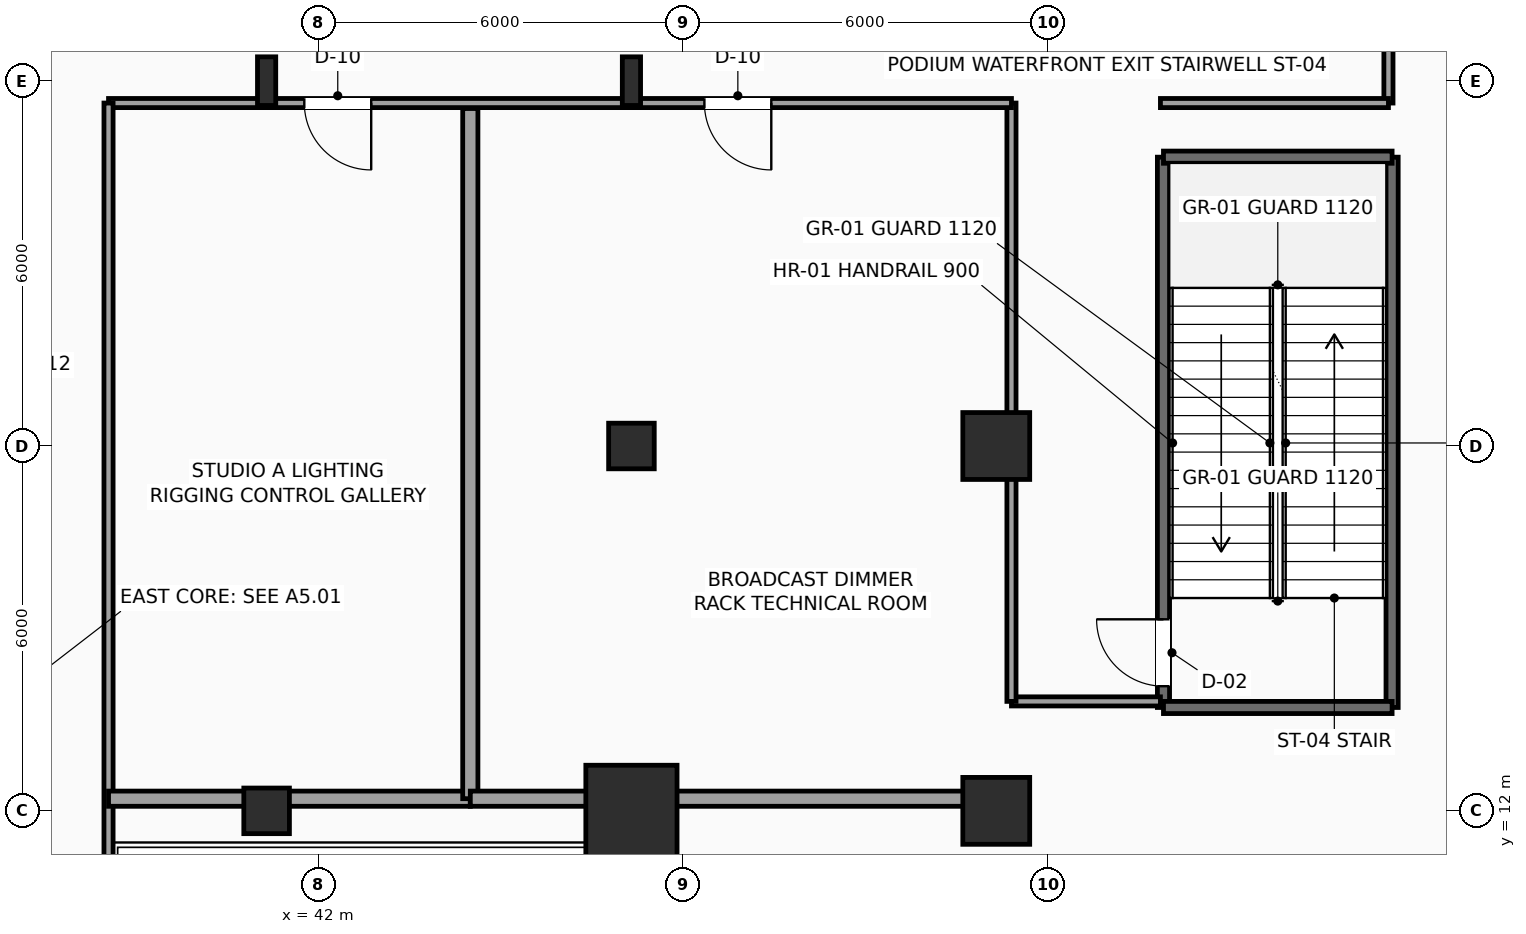
"""IFC4 building model, lengths in metres.
Left out: names, types, materials, properties, quantities, classifications, styles, units other than length and angle.
Written with IfcOpenShell. Run it as: python <this file> out.ifc"""

import sys

from ifc_helpers import new_model, si_unit, direction, frame, frame_2d, origin, origin_2d, place, context, subcontext, project, spatial, rectangle, hollow_rectangle, i_section, extrude, element, fill, save


model = new_model("IFC4")
c1 = context("Model", 3, precision=1e-05, world=origin(), true_north=direction((0.0, 1.0)))
c2 = subcontext(c1, "Body", "Model", "MODEL_VIEW")
j1 = project(units=[si_unit("LENGTHUNIT", "METRE"), si_unit("PLANEANGLEUNIT", "RADIAN")], contexts=[c1])
p1 = place(None, origin())
s1 = spatial("IfcSite", under=j1, at=p1, CompositionType="ELEMENT")
p2 = place(p1, origin())
s2 = spatial("IfcBuilding", under=s1, at=p2, CompositionType="ELEMENT")
p3 = place(p2, frame((0.0, 0.0, 11.1)))
s3 = spatial("IfcBuildingStorey", under=s2, at=p3, CompositionType="ELEMENT", Elevation=11.1)
p4 = place(p3, frame((41.15, 12.0, 0.0), z_axis=(0.0, 0.0, 1.0), x_axis=(1.0, 0.0, 0.0)))
e1 = element("IfcColumn", 1, at=p4, inside=s3, PredefinedType="COLUMN", context=c2, shape_type="SweptSolid", body=[
    extrude(hollow_rectangle(XDim=0.75, YDim=0.75, WallThickness=0.035, InnerFilletRadius=0.035, OuterFilletRadius=0.05, at=origin_2d()), origin(), (0.0, 0.0, 1.0), 5.4),
])
p5 = place(p3, frame((41.15, 24.0, 0.0), z_axis=(0.0, 0.0, 1.0), x_axis=(1.0, 0.0, 0.0)))
e2 = element("IfcColumn", 2, at=p5, inside=s3, PredefinedType="COLUMN", context=c2, shape_type="SweptSolid", body=[
    extrude(i_section(OverallWidth=0.3, OverallDepth=0.8, WebThickness=0.018, FlangeThickness=0.033, FilletRadius=0.03, at=origin_2d()), origin(), (0.0, 0.0, 1.0), 5.4),
])
p6 = place(p3, frame((47.15, 12.0, 0.0), z_axis=(0.0, 0.0, 1.0), x_axis=(1.0, 0.0, 0.0)))
e3 = element("IfcColumn", 3, at=p6, inside=s3, PredefinedType="COLUMN", context=c2, shape_type="SweptSolid", body=[
    extrude(rectangle(XDim=1.5, YDim=1.5, at=origin_2d()), origin(), (0.0, 0.0, 1.0), 5.4),
])
p7 = place(p3, frame((47.15, 18.0, 0.0), z_axis=(0.0, 0.0, 1.0), x_axis=(1.0, 0.0, 0.0)))
e4 = element("IfcColumn", 4, at=p7, inside=s3, PredefinedType="COLUMN", context=c2, shape_type="SweptSolid", body=[
    extrude(hollow_rectangle(XDim=0.75, YDim=0.75, WallThickness=0.035, InnerFilletRadius=0.035, OuterFilletRadius=0.05, at=origin_2d()), origin(), (0.0, 0.0, 1.0), 5.4),
])
p8 = place(p3, frame((47.15, 24.0, 0.0), z_axis=(0.0, 0.0, 1.0), x_axis=(1.0, 0.0, 0.0)))
e5 = element("IfcColumn", 5, at=p8, inside=s3, PredefinedType="COLUMN", context=c2, shape_type="SweptSolid", body=[
    extrude(i_section(OverallWidth=0.3, OverallDepth=0.8, WebThickness=0.018, FlangeThickness=0.033, FilletRadius=0.03, at=origin_2d()), origin(), (0.0, 0.0, 1.0), 5.4),
])
for number, where, z_axis, x_axis in (
    (6, (53.15, 12.0, 0.0), (0.0, 0.0, 1.0), (1.0, 0.0, 0.0)),
    (7, (53.15, 18.0, 0.0), (0.0, 0.0, 1.0), (1.0, 0.0, 0.0)),
):
    element("IfcColumn", number, at=place(p3, frame(where, z_axis=z_axis, x_axis=x_axis)), inside=s3, PredefinedType="COLUMN", context=c2, shape_type="SweptSolid", body=[
        extrude(rectangle(XDim=1.1, YDim=1.1, at=origin_2d()), origin(), (0.0, 0.0, 1.0), 5.4),
    ])
p9 = place(p3, frame((55.9, 13.7, 0.0), z_axis=(0.0, 0.0, 1.0), x_axis=(0.0, 1.0, 0.0)))
e8 = element("IfcWall", 8, at=p9, inside=s3, PredefinedType="SHEAR", context=c2, shape_type="SweptSolid", body=[
    extrude(rectangle(XDim=9.05, YDim=0.2, at=frame_2d((4.525, 0.0))), origin(), (0.0, 0.0, 1.0), 5.1),
])
p10 = place(p9, frame((0.35, 0.0, 0.0)))
e9 = element("IfcOpeningElement", 9, at=p10, cuts=e8, PredefinedType="OPENING", context=c2, shape_type="SweptSolid", body=[
    extrude(rectangle(XDim=1.1, YDim=2.2, at=frame_2d((0.55, 1.1))), frame((0.0, 0.11, 0.0), z_axis=(0.0, -1.0, 0.0), x_axis=(1.0, 0.0, 0.0)), (0.0, 0.0, 1.0), 0.22),
])
p11 = place(p3, frame((59.66, 13.7, 0.0), z_axis=(0.0, 0.0, 1.0), x_axis=(0.0, 1.0, 0.0)))
e10 = element("IfcWall", 10, at=p11, inside=s3, PredefinedType="SHEAR", context=c2, shape_type="SweptSolid", body=[
    extrude(rectangle(XDim=9.05, YDim=0.2, at=frame_2d((4.525, 0.0))), origin(), (0.0, 0.0, 1.0), 5.1),
])
for number, where, z_axis, x_axis in (
    (11, (55.9, 13.7, 0.0), (0.0, 0.0, 1.0), (1.0, 0.0, 0.0)),
    (12, (55.9, 22.75, 0.0), (0.0, 0.0, 1.0), (1.0, 0.0, 0.0)),
):
    element("IfcWall", number, at=place(p3, frame(where, z_axis=z_axis, x_axis=x_axis)), inside=s3, PredefinedType="SHEAR", context=c2, shape_type="SweptSolid", body=[
        extrude(rectangle(XDim=3.76, YDim=0.2, at=frame_2d((1.88, 0.0))), origin(), (0.0, 0.0, 1.0), 5.1),
    ])
p12 = place(p3, frame((59.6, 26.2, 0.0), z_axis=(0.0, 0.0, 1.0), x_axis=(0.0, -1.0, 0.0)))
e13 = element("IfcWall", 13, at=p12, inside=s3, PredefinedType="PARTITIONING", context=c2, shape_type="SweptSolid", body=[
    extrude(rectangle(XDim=2.56, YDim=0.15, at=frame_2d((1.28, 0.0))), origin(), (0.0, 0.0, 1.0), 5.1),
])
p13 = place(p3, frame((59.6, 23.64, 0.0), z_axis=(0.0, 0.0, 1.0), x_axis=(-1.0, 0.0, 0.0)))
e14 = element("IfcWall", 14, at=p13, inside=s3, PredefinedType="PARTITIONING", context=c2, shape_type="SweptSolid", body=[
    extrude(rectangle(XDim=3.75, YDim=0.15, at=frame_2d((1.875, 0.0))), origin(), (0.0, 0.0, 1.0), 5.1),
])
p14 = place(p3, frame((55.85, 13.8, 0.0), z_axis=(0.0, 0.0, 1.0), x_axis=(-1.0, 0.0, 0.0)))
e15 = element("IfcWall", 15, at=p14, inside=s3, PredefinedType="PARTITIONING", context=c2, shape_type="SweptSolid", body=[
    extrude(rectangle(XDim=2.45, YDim=0.15, at=frame_2d((1.225, 0.0))), origin(), (0.0, 0.0, 1.0), 5.1),
])
p15 = place(p3, frame((53.4, 13.8, 0.0), z_axis=(0.0, 0.0, 1.0), x_axis=(0.0, 1.0, 0.0)))
e16 = element("IfcWall", 16, at=p15, inside=s3, PredefinedType="PARTITIONING", context=c2, shape_type="SweptSolid", body=[
    extrude(rectangle(XDim=9.84, YDim=0.15, at=frame_2d((4.92, 0.0))), origin(), (0.0, 0.0, 1.0), 5.1),
])
p16 = place(p3, frame((53.4, 23.64, 0.0), z_axis=(0.0, 0.0, 1.0), x_axis=(-1.0, 0.0, 0.0)))
e17 = element("IfcWall", 17, at=p16, inside=s3, PredefinedType="PARTITIONING", context=c2, shape_type="SweptSolid", body=[
    extrude(rectangle(XDim=14.85, YDim=0.15, at=frame_2d((7.425, 0.0))), origin(), (0.0, 0.0, 1.0), 5.1),
])
p17 = place(p16, frame((10.53, 0.0, 0.0)))
e18 = element("IfcOpeningElement", 18, at=p17, cuts=e17, PredefinedType="OPENING", context=c2, shape_type="SweptSolid", body=[
    extrude(rectangle(XDim=1.1, YDim=2.25, at=frame_2d((0.55, 1.125))), frame((0.0, 0.085, 0.0), z_axis=(0.0, -1.0, 0.0), x_axis=(1.0, 0.0, 0.0)), (0.0, 0.0, 1.0), 0.17),
])
p18 = place(p16, frame((3.95, 0.0, 0.0)))
e19 = element("IfcOpeningElement", 19, at=p18, cuts=e17, PredefinedType="OPENING", context=c2, shape_type="SweptSolid", body=[
    extrude(rectangle(XDim=1.1, YDim=2.25, at=frame_2d((0.55, 1.125))), frame((0.0, 0.085, 0.0), z_axis=(0.0, -1.0, 0.0), x_axis=(1.0, 0.0, 0.0)), (0.0, 0.0, 1.0), 0.17),
])
p19 = place(p3, frame((38.55, 23.64, 0.0), z_axis=(0.0, 0.0, 1.0), x_axis=(0.0, -1.0, 0.0)))
e20 = element("IfcWall", 20, at=p19, inside=s3, PredefinedType="PARTITIONING", context=c2, shape_type="SweptSolid", body=[
    extrude(rectangle(XDim=17.79, YDim=0.15, at=frame_2d((8.895, 0.0))), origin(), (0.0, 0.0, 1.0), 5.1),
])
p20 = place(p3, frame((38.55, 12.2, 0.0), z_axis=(0.0, 0.0, 1.0), x_axis=(1.0, 0.0, 0.0)))
e21 = element("IfcWall", 21, at=p20, inside=s3, PredefinedType="PARTITIONING", context=c2, shape_type="SweptSolid", body=[
    extrude(rectangle(XDim=5.95, YDim=0.25, at=frame_2d((2.975, 0.0))), origin(), (0.0, 0.0, 1.0), 4.442),
])
p21 = place(p3, frame((44.5, 12.2, 0.0), z_axis=(0.0, 0.0, 1.0), x_axis=(0.0, 1.0, 0.0)))
e22 = element("IfcWall", 22, at=p21, inside=s3, PredefinedType="PARTITIONING", context=c2, shape_type="SweptSolid", body=[
    extrude(rectangle(XDim=11.35, YDim=0.25, at=frame_2d((5.675, 0.0))), origin(), (0.0, 0.0, 1.0), 5.1),
])
p22 = place(p3, frame((44.5, 12.2, 0.0), z_axis=(0.0, 0.0, 1.0), x_axis=(1.0, 0.0, 0.0)))
e23 = element("IfcWall", 23, at=p22, inside=s3, PredefinedType="PARTITIONING", context=c2, shape_type="SweptSolid", body=[
    extrude(rectangle(XDim=8.9, YDim=0.25, at=frame_2d((4.45, 0.0))), origin(), (0.0, 0.0, 1.0), 4.442),
])
p23 = place(p10, origin())
e24 = element("IfcDoor", 24, at=p23, inside=s3, OperationType="SINGLE_SWING_RIGHT", PredefinedType="DOOR", context=c2, shape_type="SweptSolid", body=[
    extrude(rectangle(XDim=1.1, YDim=2.2, at=frame_2d((0.55, 1.1))), frame((0.0, 0.025, 0.0), z_axis=(0.0, -1.0, 0.0), x_axis=(1.0, 0.0, 0.0)), (0.0, 0.0, 1.0), 0.05),
])
fill(e9, e24)
p24 = place(p17, origin())
e25 = element("IfcDoor", 25, at=p24, inside=s3, OperationType="SINGLE_SWING_LEFT", PredefinedType="DOOR", context=c2, shape_type="SweptSolid", body=[
    extrude(rectangle(XDim=1.1, YDim=2.25, at=frame_2d((0.55, 1.125))), frame((0.0, 0.025, 0.0), z_axis=(0.0, -1.0, 0.0), x_axis=(1.0, 0.0, 0.0)), (0.0, 0.0, 1.0), 0.05),
])
fill(e18, e25)
p25 = place(p18, origin())
e26 = element("IfcDoor", 26, at=p25, inside=s3, OperationType="SINGLE_SWING_LEFT", PredefinedType="DOOR", context=c2, shape_type="SweptSolid", body=[
    extrude(rectangle(XDim=1.1, YDim=2.25, at=frame_2d((0.55, 1.125))), frame((0.0, 0.025, 0.0), z_axis=(0.0, -1.0, 0.0), x_axis=(1.0, 0.0, 0.0)), (0.0, 0.0, 1.0), 0.05),
])
fill(e19, e26)
save(model, sys.argv[1])
